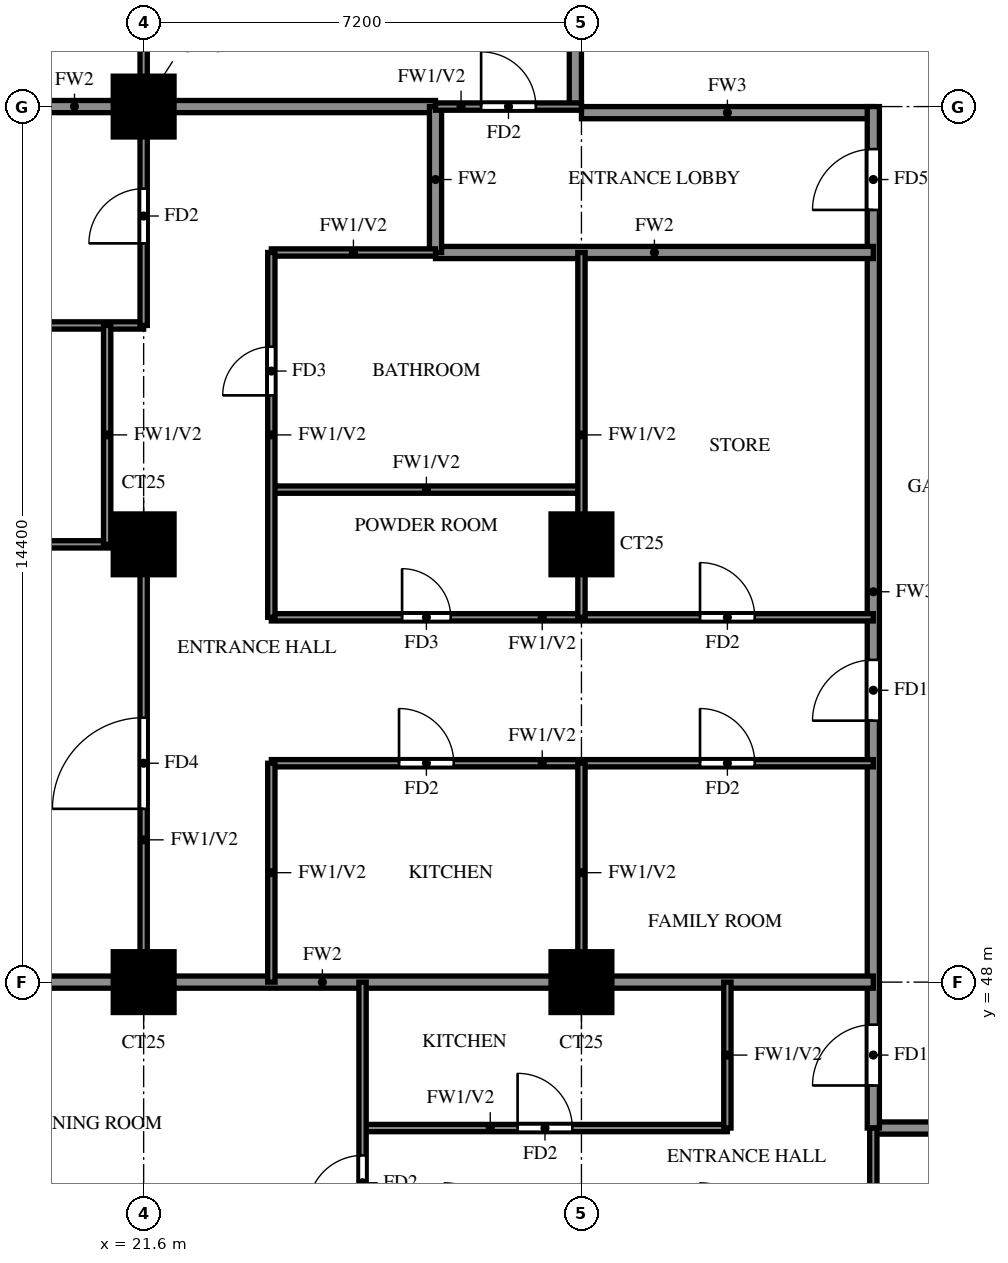
"""IFC4 building model, lengths in metres.
Left out: names, types, materials, properties, quantities, classifications, styles, units other than length and angle.
Written with IfcOpenShell. Run it as: python <this file> out.ifc"""

import sys

from ifc_helpers import new_model, si_unit, direction, frame, frame_2d, origin, origin_2d, place, context, subcontext, project, spatial, rectangle, extrude, source, transform, mapped, element, fill, save


model = new_model("IFC4")
c1 = context("Model", 3, precision=1e-05, world=origin(), true_north=direction((0.0, 1.0)))
c2 = subcontext(c1, "Body", "Model", "MODEL_VIEW")
j1 = project(units=[si_unit("LENGTHUNIT", "METRE"), si_unit("PLANEANGLEUNIT", "RADIAN")], contexts=[c1])
p1 = place(None, origin())
s1 = spatial("IfcSite", under=j1, at=p1, CompositionType="ELEMENT")
p2 = place(p1, origin())
s2 = spatial("IfcBuilding", under=s1, at=p2, CompositionType="ELEMENT")
p3 = place(p2, frame((0.0, 0.0, 146.5)))
s3 = spatial("IfcBuildingStorey", under=s2, at=p3, CompositionType="ELEMENT", Elevation=146.5)
m1 = source(origin(), c2, "Body", "SweptSolid", [
    extrude(rectangle(XDim=1.0, YDim=1.0, at=origin_2d()), origin(), (0.0, 0.0, 1.0), 3.2),
])
for number, where, z_axis, x_axis in (
    (1, (21.6, 48.0, 0.0), (0.0, 0.0, 1.0), (1.0, 0.0, 0.0)),
    (2, (28.8, 48.0, 0.0), (0.0, 0.0, 1.0), (1.0, 0.0, 0.0)),
    (3, (21.6, 55.2, 0.0), (0.0, 0.0, 1.0), (1.0, 0.0, 0.0)),
    (4, (28.8, 55.2, 0.0), (0.0, 0.0, 1.0), (1.0, 0.0, 0.0)),
    (5, (21.6, 62.4, 0.0), (0.0, 0.0, 1.0), (1.0, 0.0, 0.0)),
):
    element("IfcColumn", number, at=place(p3, frame(where, z_axis=z_axis, x_axis=x_axis)), inside=s3, PredefinedType="COLUMN", context=c2, shape_type="MappedRepresentation", body=[
        mapped(m1, transform((0.0, 0.0, 0.0))),
    ])
p4 = place(p3, frame((33.6, 45.6, 0.0), z_axis=(0.0, 0.0, 1.0), x_axis=(1.0, 0.0, 0.0)))
e6 = element("IfcWall", 6, at=p4, inside=s3, PredefinedType="SOLIDWALL", context=c2, shape_type="SweptSolid", body=[
    extrude(rectangle(XDim=7.2, YDim=0.2, at=frame_2d((3.6, 0.0))), origin(), (0.0, 0.0, 1.0), 3.2),
])
p5 = place(p4, frame((3.15, 0.0, 0.0)))
e7 = element("IfcOpeningElement", 7, at=p5, cuts=e6, PredefinedType="OPENING", context=c2, shape_type="SweptSolid", body=[
    extrude(rectangle(XDim=0.9, YDim=2.1, at=frame_2d((0.45, 1.05))), frame((0.0, 0.11, 0.0), z_axis=(0.0, -1.0, 0.0), x_axis=(1.0, 0.0, 0.0)), (0.0, 0.0, 1.0), 0.22),
])
p6 = place(p3, frame((28.8, 62.3, 0.0), z_axis=(0.0, 0.0, 1.0), x_axis=(1.0, 0.0, 0.0)))
e8 = element("IfcWall", 8, at=p6, inside=s3, PredefinedType="SOLIDWALL", context=c2, shape_type="SweptSolid", body=[
    extrude(rectangle(XDim=4.8, YDim=0.2, at=frame_2d((2.4, 0.0))), origin(), (0.0, 0.0, 1.0), 3.2),
])
p7 = place(p3, frame((28.7, 62.4, 0.0), z_axis=(0.0, 0.0, 1.0), x_axis=(0.0, 1.0, 0.0)))
e9 = element("IfcWall", 9, at=p7, inside=s3, PredefinedType="SOLIDWALL", context=c2, shape_type="SweptSolid", body=[
    extrude(rectangle(XDim=15.6, YDim=0.2, at=frame_2d((7.8, 0.0))), origin(), (0.0, 0.0, 1.0), 3.2),
])
p8 = place(p3, frame((33.6, 45.6, 0.0), z_axis=(0.0, 0.0, 1.0), x_axis=(0.0, 1.0, 0.0)))
e10 = element("IfcWall", 10, at=p8, inside=s3, PredefinedType="SOLIDWALL", context=c2, shape_type="SweptSolid", body=[
    extrude(rectangle(XDim=16.8, YDim=0.2, at=frame_2d((8.4, 0.0))), origin(), (0.0, 0.0, 1.0), 3.2),
])
p9 = place(p8, frame((0.7, 0.0, 0.0)))
e11 = element("IfcOpeningElement", 11, at=p9, cuts=e10, PredefinedType="OPENING", context=c2, shape_type="SweptSolid", body=[
    extrude(rectangle(XDim=1.0, YDim=2.1, at=frame_2d((0.5, 1.05))), frame((0.0, 0.11, 0.0), z_axis=(0.0, -1.0, 0.0), x_axis=(1.0, 0.0, 0.0)), (0.0, 0.0, 1.0), 0.22),
])
p10 = place(p8, frame((6.7, 0.0, 0.0)))
e12 = element("IfcOpeningElement", 12, at=p10, cuts=e10, PredefinedType="OPENING", context=c2, shape_type="SweptSolid", body=[
    extrude(rectangle(XDim=1.0, YDim=2.1, at=frame_2d((0.5, 1.05))), frame((0.0, 0.11, 0.0), z_axis=(0.0, -1.0, 0.0), x_axis=(1.0, 0.0, 0.0)), (0.0, 0.0, 1.0), 0.22),
])
p11 = place(p8, frame((15.1, 0.0, 0.0)))
e13 = element("IfcOpeningElement", 13, at=p11, cuts=e10, PredefinedType="OPENING", context=c2, shape_type="SweptSolid", body=[
    extrude(rectangle(XDim=1.0, YDim=2.1, at=frame_2d((0.5, 1.05))), frame((0.0, 0.11, 0.0), z_axis=(0.0, -1.0, 0.0), x_axis=(1.0, 0.0, 0.0)), (0.0, 0.0, 1.0), 0.22),
])
p12 = place(p3, frame((14.525, 48.0, 0.0), z_axis=(0.0, 0.0, 1.0), x_axis=(1.0, 0.0, 0.0)))
e14 = element("IfcWall", 14, at=p12, inside=s3, PredefinedType="SOLIDWALL", context=c2, shape_type="SweptSolid", body=[
    extrude(rectangle(XDim=19.075, YDim=0.2, at=frame_2d((9.538, 0.0))), origin(), (0.0, 0.0, 1.0), 3.2),
])
p13 = place(p3, frame((26.4, 60.0, 0.0), z_axis=(0.0, 0.0, 1.0), x_axis=(1.0, 0.0, 0.0)))
e15 = element("IfcWall", 15, at=p13, inside=s3, PredefinedType="SOLIDWALL", context=c2, shape_type="SweptSolid", body=[
    extrude(rectangle(XDim=7.2, YDim=0.2, at=frame_2d((3.6, 0.0))), origin(), (0.0, 0.0, 1.0), 3.2),
])
p14 = place(p3, frame((14.525, 62.4, 0.0), z_axis=(0.0, 0.0, 1.0), x_axis=(1.0, 0.0, 0.0)))
e16 = element("IfcWall", 16, at=p14, inside=s3, PredefinedType="SOLIDWALL", context=c2, shape_type="SweptSolid", body=[
    extrude(rectangle(XDim=11.875, YDim=0.2, at=frame_2d((5.938, 0.0))), origin(), (0.0, 0.0, 1.0), 3.2),
])
p15 = place(p3, frame((26.4, 60.0, 0.0), z_axis=(0.0, 0.0, 1.0), x_axis=(0.0, 1.0, 0.0)))
e17 = element("IfcWall", 17, at=p15, inside=s3, PredefinedType="SOLIDWALL", context=c2, shape_type="SweptSolid", body=[
    extrude(rectangle(XDim=2.4, YDim=0.2, at=frame_2d((1.2, 0.0))), origin(), (0.0, 0.0, 1.0), 3.2),
])
p16 = place(p3, frame((25.2, 45.6, 0.0), z_axis=(0.0, 0.0, 1.0), x_axis=(1.0, 0.0, 0.0)))
e18 = element("IfcWall", 18, at=p16, inside=s3, PredefinedType="PARTITIONING", context=c2, shape_type="SweptSolid", body=[
    extrude(rectangle(XDim=6.0, YDim=0.12, at=frame_2d((3.0, 0.0))), origin(), (0.0, 0.0, 1.0), 3.2),
])
p17 = place(p16, frame((2.55, 0.0, 0.0)))
e19 = element("IfcOpeningElement", 19, at=p17, cuts=e18, PredefinedType="OPENING", context=c2, shape_type="SweptSolid", body=[
    extrude(rectangle(XDim=0.9, YDim=2.1, at=frame_2d((0.45, 1.05))), frame((0.0, 0.07, 0.0), z_axis=(0.0, -1.0, 0.0), x_axis=(1.0, 0.0, 0.0)), (0.0, 0.0, 1.0), 0.14),
])
p18 = place(p3, frame((23.7, 51.6, 0.0), z_axis=(0.0, 0.0, 1.0), x_axis=(1.0, 0.0, 0.0)))
e20 = element("IfcWall", 20, at=p18, inside=s3, PredefinedType="PARTITIONING", context=c2, shape_type="SweptSolid", body=[
    extrude(rectangle(XDim=9.9, YDim=0.12, at=frame_2d((4.95, 0.0))), origin(), (0.0, 0.0, 1.0), 3.2),
])
p19 = place(p18, frame((2.1, 0.0, 0.0)))
e21 = element("IfcOpeningElement", 21, at=p19, cuts=e20, PredefinedType="OPENING", context=c2, shape_type="SweptSolid", body=[
    extrude(rectangle(XDim=0.9, YDim=2.1, at=frame_2d((0.45, 1.05))), frame((0.0, 0.07, 0.0), z_axis=(0.0, -1.0, 0.0), x_axis=(1.0, 0.0, 0.0)), (0.0, 0.0, 1.0), 0.14),
])
p20 = place(p18, frame((7.05, 0.0, 0.0)))
e22 = element("IfcOpeningElement", 22, at=p20, cuts=e20, PredefinedType="OPENING", context=c2, shape_type="SweptSolid", body=[
    extrude(rectangle(XDim=0.9, YDim=2.1, at=frame_2d((0.45, 1.05))), frame((0.0, 0.07, 0.0), z_axis=(0.0, -1.0, 0.0), x_axis=(1.0, 0.0, 0.0)), (0.0, 0.0, 1.0), 0.14),
])
p21 = place(p3, frame((23.7, 54.0, 0.0), z_axis=(0.0, 0.0, 1.0), x_axis=(1.0, 0.0, 0.0)))
e23 = element("IfcWall", 23, at=p21, inside=s3, PredefinedType="PARTITIONING", context=c2, shape_type="SweptSolid", body=[
    extrude(rectangle(XDim=9.9, YDim=0.12, at=frame_2d((4.95, 0.0))), origin(), (0.0, 0.0, 1.0), 3.2),
])
p22 = place(p21, frame((2.15, 0.0, 0.0)))
e24 = element("IfcOpeningElement", 24, at=p22, cuts=e23, PredefinedType="OPENING", context=c2, shape_type="SweptSolid", body=[
    extrude(rectangle(XDim=0.8, YDim=2.1, at=frame_2d((0.4, 1.05))), frame((0.0, 0.07, 0.0), z_axis=(0.0, -1.0, 0.0), x_axis=(1.0, 0.0, 0.0)), (0.0, 0.0, 1.0), 0.14),
])
p23 = place(p21, frame((7.05, 0.0, 0.0)))
e25 = element("IfcOpeningElement", 25, at=p23, cuts=e23, PredefinedType="OPENING", context=c2, shape_type="SweptSolid", body=[
    extrude(rectangle(XDim=0.9, YDim=2.1, at=frame_2d((0.45, 1.05))), frame((0.0, 0.07, 0.0), z_axis=(0.0, -1.0, 0.0), x_axis=(1.0, 0.0, 0.0)), (0.0, 0.0, 1.0), 0.14),
])
p24 = place(p3, frame((14.525, 55.2, 0.0), z_axis=(0.0, 0.0, 1.0), x_axis=(1.0, 0.0, 0.0)))
e26 = element("IfcWall", 26, at=p24, inside=s3, PredefinedType="PARTITIONING", context=c2, shape_type="SweptSolid", body=[
    extrude(rectangle(XDim=7.075, YDim=0.12, at=frame_2d((3.538, 0.0))), origin(), (0.0, 0.0, 1.0), 3.2),
])
p25 = place(p3, frame((23.7, 56.1, 0.0), z_axis=(0.0, 0.0, 1.0), x_axis=(1.0, 0.0, 0.0)))
e27 = element("IfcWall", 27, at=p25, inside=s3, PredefinedType="PARTITIONING", context=c2, shape_type="SweptSolid", body=[
    extrude(rectangle(XDim=5.1, YDim=0.12, at=frame_2d((2.55, 0.0))), origin(), (0.0, 0.0, 1.0), 3.2),
])
p26 = place(p3, frame((14.525, 58.8, 0.0), z_axis=(0.0, 0.0, 1.0), x_axis=(1.0, 0.0, 0.0)))
e28 = element("IfcWall", 28, at=p26, inside=s3, PredefinedType="PARTITIONING", context=c2, shape_type="SweptSolid", body=[
    extrude(rectangle(XDim=7.075, YDim=0.12, at=frame_2d((3.538, 0.0))), origin(), (0.0, 0.0, 1.0), 2.3),
])
p27 = place(p26, frame((2.837, 0.0, 0.0)))
e29 = element("IfcOpeningElement", 29, at=p27, cuts=e28, PredefinedType="OPENING", context=c2, shape_type="SweptSolid", body=[
    extrude(rectangle(XDim=0.8, YDim=2.1, at=frame_2d((0.4, 1.05))), frame((0.0, 0.07, 0.0), z_axis=(0.0, -1.0, 0.0), x_axis=(1.0, 0.0, 0.0)), (0.0, 0.0, 1.0), 0.14),
])
p28 = place(p3, frame((23.7, 60.0, 0.0), z_axis=(0.0, 0.0, 1.0), x_axis=(1.0, 0.0, 0.0)))
e30 = element("IfcWall", 30, at=p28, inside=s3, PredefinedType="PARTITIONING", context=c2, shape_type="SweptSolid", body=[
    extrude(rectangle(XDim=2.7, YDim=0.12, at=frame_2d((1.35, 0.0))), origin(), (0.0, 0.0, 1.0), 3.2),
])
p29 = place(p3, frame((26.4, 62.4, 0.0), z_axis=(0.0, 0.0, 1.0), x_axis=(1.0, 0.0, 0.0)))
e31 = element("IfcWall", 31, at=p29, inside=s3, PredefinedType="PARTITIONING", context=c2, shape_type="SweptSolid", body=[
    extrude(rectangle(XDim=2.4, YDim=0.12, at=frame_2d((1.2, 0.0))), origin(), (0.0, 0.0, 1.0), 3.2),
])
p30 = place(p29, frame((0.75, 0.0, 0.0)))
e32 = element("IfcOpeningElement", 32, at=p30, cuts=e31, PredefinedType="OPENING", context=c2, shape_type="SweptSolid", body=[
    extrude(rectangle(XDim=0.9, YDim=2.1, at=frame_2d((0.45, 1.05))), frame((0.0, 0.07, 0.0), z_axis=(0.0, -1.0, 0.0), x_axis=(1.0, 0.0, 0.0)), (0.0, 0.0, 1.0), 0.14),
])
p31 = place(p3, frame((21.0, 55.2, 0.0), z_axis=(0.0, 0.0, 1.0), x_axis=(0.0, 1.0, 0.0)))
e33 = element("IfcWall", 33, at=p31, inside=s3, PredefinedType="PARTITIONING", context=c2, shape_type="SweptSolid", body=[
    extrude(rectangle(XDim=3.6, YDim=0.12, at=frame_2d((1.8, 0.0))), origin(), (0.0, 0.0, 1.0), 3.2),
])
p32 = place(p3, frame((21.6, 48.0, 0.0), z_axis=(0.0, 0.0, 1.0), x_axis=(0.0, 1.0, 0.0)))
e34 = element("IfcWall", 34, at=p32, inside=s3, PredefinedType="PARTITIONING", context=c2, shape_type="SweptSolid", body=[
    extrude(rectangle(XDim=7.2, YDim=0.12, at=frame_2d((3.6, 0.0))), origin(), (0.0, 0.0, 1.0), 3.2),
])
p33 = place(p32, frame((2.85, 0.0, 0.0)))
e35 = element("IfcOpeningElement", 35, at=p33, cuts=e34, PredefinedType="OPENING", context=c2, shape_type="SweptSolid", body=[
    extrude(rectangle(XDim=1.5, YDim=2.1, at=frame_2d((0.75, 1.05))), frame((0.0, 0.07, 0.0), z_axis=(0.0, -1.0, 0.0), x_axis=(1.0, 0.0, 0.0)), (0.0, 0.0, 1.0), 0.14),
])
p34 = place(p3, frame((21.6, 58.8, 0.0), z_axis=(0.0, 0.0, 1.0), x_axis=(0.0, 1.0, 0.0)))
e36 = element("IfcWall", 36, at=p34, inside=s3, PredefinedType="PARTITIONING", context=c2, shape_type="SweptSolid", body=[
    extrude(rectangle(XDim=10.8, YDim=0.12, at=frame_2d((5.4, 0.0))), origin(), (0.0, 0.0, 1.0), 3.2),
])
p35 = place(p34, frame((1.35, 0.0, 0.0)))
e37 = element("IfcOpeningElement", 37, at=p35, cuts=e36, PredefinedType="OPENING", context=c2, shape_type="SweptSolid", body=[
    extrude(rectangle(XDim=0.9, YDim=2.1, at=frame_2d((0.45, 1.05))), frame((0.0, 0.07, 0.0), z_axis=(0.0, -1.0, 0.0), x_axis=(1.0, 0.0, 0.0)), (0.0, 0.0, 1.0), 0.14),
])
p36 = place(p34, frame((4.95, 0.0, 0.0)))
e38 = element("IfcOpeningElement", 38, at=p36, cuts=e36, PredefinedType="OPENING", context=c2, shape_type="SweptSolid", body=[
    extrude(rectangle(XDim=0.9, YDim=2.1, at=frame_2d((0.45, 1.05))), frame((0.0, 0.07, 0.0), z_axis=(0.0, -1.0, 0.0), x_axis=(1.0, 0.0, 0.0)), (0.0, 0.0, 1.0), 0.14),
])
p37 = place(p34, frame((8.55, 0.0, 0.0)))
e39 = element("IfcOpeningElement", 39, at=p37, cuts=e36, PredefinedType="OPENING", context=c2, shape_type="SweptSolid", body=[
    extrude(rectangle(XDim=0.9, YDim=2.1, at=frame_2d((0.45, 1.05))), frame((0.0, 0.07, 0.0), z_axis=(0.0, -1.0, 0.0), x_axis=(1.0, 0.0, 0.0)), (0.0, 0.0, 1.0), 0.14),
])
p38 = place(p3, frame((23.7, 48.0, 0.0), z_axis=(0.0, 0.0, 1.0), x_axis=(0.0, 1.0, 0.0)))
e40 = element("IfcWall", 40, at=p38, inside=s3, PredefinedType="PARTITIONING", context=c2, shape_type="SweptSolid", body=[
    extrude(rectangle(XDim=3.6, YDim=0.12, at=frame_2d((1.8, 0.0))), origin(), (0.0, 0.0, 1.0), 3.2),
])
p39 = place(p3, frame((23.7, 54.0, 0.0), z_axis=(0.0, 0.0, 1.0), x_axis=(0.0, 1.0, 0.0)))
e41 = element("IfcWall", 41, at=p39, inside=s3, PredefinedType="PARTITIONING", context=c2, shape_type="SweptSolid", body=[
    extrude(rectangle(XDim=6.0, YDim=0.12, at=frame_2d((3.0, 0.0))), origin(), (0.0, 0.0, 1.0), 3.2),
])
p40 = place(p39, frame((3.65, 0.0, 0.0)))
e42 = element("IfcOpeningElement", 42, at=p40, cuts=e41, PredefinedType="OPENING", context=c2, shape_type="SweptSolid", body=[
    extrude(rectangle(XDim=0.8, YDim=2.1, at=frame_2d((0.4, 1.05))), frame((0.0, 0.07, 0.0), z_axis=(0.0, -1.0, 0.0), x_axis=(1.0, 0.0, 0.0)), (0.0, 0.0, 1.0), 0.14),
])
p41 = place(p3, frame((25.2, 39.725, 0.0), z_axis=(0.0, 0.0, 1.0), x_axis=(0.0, 1.0, 0.0)))
e43 = element("IfcWall", 43, at=p41, inside=s3, PredefinedType="PARTITIONING", context=c2, shape_type="SweptSolid", body=[
    extrude(rectangle(XDim=8.275, YDim=0.12, at=frame_2d((4.137, 0.0))), origin(), (0.0, 0.0, 1.0), 3.2),
])
p42 = place(p41, frame((4.525, 0.0, 0.0)))
e44 = element("IfcOpeningElement", 44, at=p42, cuts=e43, PredefinedType="OPENING", context=c2, shape_type="SweptSolid", body=[
    extrude(rectangle(XDim=0.9, YDim=2.1, at=frame_2d((0.45, 1.05))), frame((0.0, 0.07, 0.0), z_axis=(0.0, -1.0, 0.0), x_axis=(1.0, 0.0, 0.0)), (0.0, 0.0, 1.0), 0.14),
])
p43 = place(p3, frame((28.8, 48.0, 0.0), z_axis=(0.0, 0.0, 1.0), x_axis=(0.0, 1.0, 0.0)))
e45 = element("IfcWall", 45, at=p43, inside=s3, PredefinedType="PARTITIONING", context=c2, shape_type="SweptSolid", body=[
    extrude(rectangle(XDim=3.6, YDim=0.12, at=frame_2d((1.8, 0.0))), origin(), (0.0, 0.0, 1.0), 3.2),
])
p44 = place(p3, frame((28.8, 54.0, 0.0), z_axis=(0.0, 0.0, 1.0), x_axis=(0.0, 1.0, 0.0)))
e46 = element("IfcWall", 46, at=p44, inside=s3, PredefinedType="PARTITIONING", context=c2, shape_type="SweptSolid", body=[
    extrude(rectangle(XDim=6.0, YDim=0.12, at=frame_2d((3.0, 0.0))), origin(), (0.0, 0.0, 1.0), 3.2),
])
p45 = place(p3, frame((31.2, 45.6, 0.0), z_axis=(0.0, 0.0, 1.0), x_axis=(0.0, 1.0, 0.0)))
e47 = element("IfcWall", 47, at=p45, inside=s3, PredefinedType="PARTITIONING", context=c2, shape_type="SweptSolid", body=[
    extrude(rectangle(XDim=2.4, YDim=0.12, at=frame_2d((1.2, 0.0))), origin(), (0.0, 0.0, 1.0), 3.2),
])
p46 = place(p3, frame((33.6, 39.725, 0.0), z_axis=(0.0, 0.0, 1.0), x_axis=(0.0, 1.0, 0.0)))
e48 = element("IfcWall", 48, at=p46, inside=s3, PredefinedType="PARTITIONING", context=c2, shape_type="SweptSolid", body=[
    extrude(rectangle(XDim=5.875, YDim=0.12, at=frame_2d((2.938, 0.0))), origin(), (0.0, 0.0, 1.0), 3.2),
])
p47 = place(p9, origin())
e49 = element("IfcDoor", 49, at=p47, inside=s3, OperationType="SINGLE_SWING_LEFT", PredefinedType="DOOR", context=c2, shape_type="SweptSolid", body=[
    extrude(rectangle(XDim=1.0, YDim=2.1, at=frame_2d((0.5, 1.05))), frame((0.0, 0.025, 0.0), z_axis=(0.0, -1.0, 0.0), x_axis=(1.0, 0.0, 0.0)), (0.0, 0.0, 1.0), 0.05),
])
fill(e11, e49)
p48 = place(p42, origin())
e50 = element("IfcDoor", 50, at=p48, inside=s3, OperationType="SINGLE_SWING_RIGHT", PredefinedType="DOOR", context=c2, shape_type="SweptSolid", body=[
    extrude(rectangle(XDim=0.9, YDim=2.1, at=frame_2d((0.45, 1.05))), frame((0.0, 0.025, 0.0), z_axis=(0.0, -1.0, 0.0), x_axis=(1.0, 0.0, 0.0)), (0.0, 0.0, 1.0), 0.05),
])
fill(e44, e50)
p49 = place(p17, origin())
e51 = element("IfcDoor", 51, at=p49, inside=s3, OperationType="SINGLE_SWING_RIGHT", PredefinedType="DOOR", context=c2, shape_type="SweptSolid", body=[
    extrude(rectangle(XDim=0.9, YDim=2.1, at=frame_2d((0.45, 1.05))), frame((0.0, 0.025, 0.0), z_axis=(0.0, -1.0, 0.0), x_axis=(1.0, 0.0, 0.0)), (0.0, 0.0, 1.0), 0.05),
])
fill(e19, e51)
p50 = place(p10, origin())
e52 = element("IfcDoor", 52, at=p50, inside=s3, OperationType="SINGLE_SWING_LEFT", PredefinedType="DOOR", context=c2, shape_type="SweptSolid", body=[
    extrude(rectangle(XDim=1.0, YDim=2.1, at=frame_2d((0.5, 1.05))), frame((0.0, 0.025, 0.0), z_axis=(0.0, -1.0, 0.0), x_axis=(1.0, 0.0, 0.0)), (0.0, 0.0, 1.0), 0.05),
])
fill(e12, e52)
p51 = place(p33, origin())
e53 = element("IfcDoor", 53, at=p51, inside=s3, OperationType="SINGLE_SWING_RIGHT", PredefinedType="DOOR", context=c2, shape_type="SweptSolid", body=[
    extrude(rectangle(XDim=1.5, YDim=2.1, at=frame_2d((0.75, 1.05))), frame((0.0, 0.025, 0.0), z_axis=(0.0, -1.0, 0.0), x_axis=(1.0, 0.0, 0.0)), (0.0, 0.0, 1.0), 0.05),
])
fill(e35, e53)
p52 = place(p35, origin())
e54 = element("IfcDoor", 54, at=p52, inside=s3, OperationType="SINGLE_SWING_LEFT", PredefinedType="DOOR", context=c2, shape_type="SweptSolid", body=[
    extrude(rectangle(XDim=0.9, YDim=2.1, at=frame_2d((0.45, 1.05))), frame((0.0, 0.025, 0.0), z_axis=(0.0, -1.0, 0.0), x_axis=(1.0, 0.0, 0.0)), (0.0, 0.0, 1.0), 0.05),
])
fill(e37, e54)
p53 = place(p19, origin())
e55 = element("IfcDoor", 55, at=p53, inside=s3, OperationType="SINGLE_SWING_RIGHT", PredefinedType="DOOR", context=c2, shape_type="SweptSolid", body=[
    extrude(rectangle(XDim=0.9, YDim=2.1, at=frame_2d((0.45, 1.05))), frame((0.0, 0.025, 0.0), z_axis=(0.0, -1.0, 0.0), x_axis=(1.0, 0.0, 0.0)), (0.0, 0.0, 1.0), 0.05),
])
fill(e21, e55)
p54 = place(p22, origin())
e56 = element("IfcDoor", 56, at=p54, inside=s3, OperationType="SINGLE_SWING_LEFT", PredefinedType="DOOR", context=c2, shape_type="SweptSolid", body=[
    extrude(rectangle(XDim=0.8, YDim=2.1, at=frame_2d((0.4, 1.05))), frame((0.0, 0.025, 0.0), z_axis=(0.0, -1.0, 0.0), x_axis=(1.0, 0.0, 0.0)), (0.0, 0.0, 1.0), 0.05),
])
fill(e24, e56)
p55 = place(p40, origin())
e57 = element("IfcDoor", 57, at=p55, inside=s3, OperationType="SINGLE_SWING_LEFT", PredefinedType="DOOR", context=c2, shape_type="SweptSolid", body=[
    extrude(rectangle(XDim=0.8, YDim=2.1, at=frame_2d((0.4, 1.05))), frame((0.0, 0.025, 0.0), z_axis=(0.0, -1.0, 0.0), x_axis=(1.0, 0.0, 0.0)), (0.0, 0.0, 1.0), 0.05),
])
fill(e42, e57)
p56 = place(p20, origin())
e58 = element("IfcDoor", 58, at=p56, inside=s3, OperationType="SINGLE_SWING_RIGHT", PredefinedType="DOOR", context=c2, shape_type="SweptSolid", body=[
    extrude(rectangle(XDim=0.9, YDim=2.1, at=frame_2d((0.45, 1.05))), frame((0.0, 0.025, 0.0), z_axis=(0.0, -1.0, 0.0), x_axis=(1.0, 0.0, 0.0)), (0.0, 0.0, 1.0), 0.05),
])
fill(e22, e58)
p57 = place(p23, origin())
e59 = element("IfcDoor", 59, at=p57, inside=s3, OperationType="SINGLE_SWING_LEFT", PredefinedType="DOOR", context=c2, shape_type="SweptSolid", body=[
    extrude(rectangle(XDim=0.9, YDim=2.1, at=frame_2d((0.45, 1.05))), frame((0.0, 0.025, 0.0), z_axis=(0.0, -1.0, 0.0), x_axis=(1.0, 0.0, 0.0)), (0.0, 0.0, 1.0), 0.05),
])
fill(e25, e59)
p58 = place(p30, origin())
e60 = element("IfcDoor", 60, at=p58, inside=s3, OperationType="SINGLE_SWING_LEFT", PredefinedType="DOOR", context=c2, shape_type="SweptSolid", body=[
    extrude(rectangle(XDim=0.9, YDim=2.1, at=frame_2d((0.45, 1.05))), frame((0.0, 0.025, 0.0), z_axis=(0.0, -1.0, 0.0), x_axis=(1.0, 0.0, 0.0)), (0.0, 0.0, 1.0), 0.05),
])
fill(e32, e60)
p59 = place(p11, origin())
e61 = element("IfcDoor", 61, at=p59, inside=s3, OperationType="SINGLE_SWING_RIGHT", PredefinedType="DOOR", context=c2, shape_type="SweptSolid", body=[
    extrude(rectangle(XDim=1.0, YDim=2.1, at=frame_2d((0.5, 1.05))), frame((0.0, 0.025, 0.0), z_axis=(0.0, -1.0, 0.0), x_axis=(1.0, 0.0, 0.0)), (0.0, 0.0, 1.0), 0.05),
])
fill(e13, e61)
save(model, sys.argv[1])
